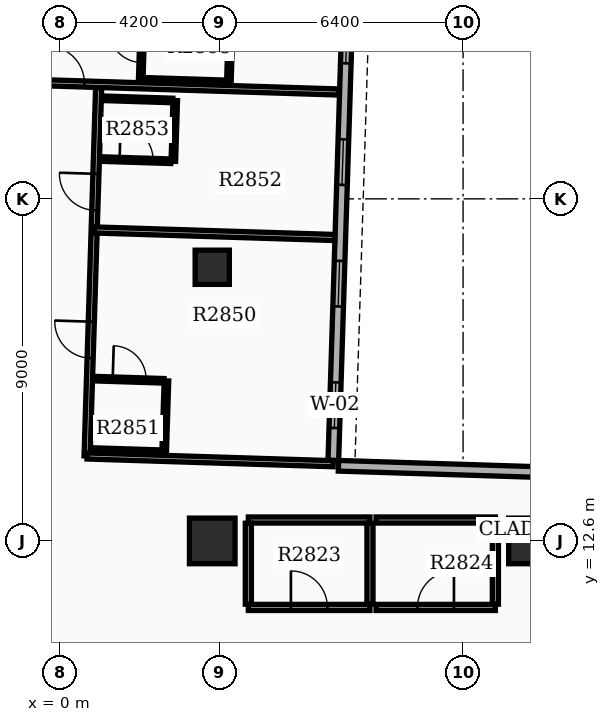
"""IFC4 building model, lengths in metres.
Left out: names, types, materials, properties, quantities, classifications, styles, units other than length and angle.
Written with IfcOpenShell. Run it as: python <this file> out.ifc"""

import sys

from ifc_helpers import new_model, si_unit, direction, frame, frame_2d, origin, origin_2d, place, context, subcontext, project, spatial, rectangle, extrude, element, fill, save


model = new_model("IFC4")
c1 = context("Model", 3, precision=1e-05, world=origin(), true_north=direction((0.0, 1.0)))
c2 = subcontext(c1, "Body", "Model", "MODEL_VIEW")
j1 = project(units=[si_unit("LENGTHUNIT", "METRE"), si_unit("PLANEANGLEUNIT", "RADIAN")], contexts=[c1])
p1 = place(None, origin())
s1 = spatial("IfcSite", under=j1, at=p1, CompositionType="ELEMENT")
p2 = place(p1, origin())
s2 = spatial("IfcBuilding", under=s1, at=p2, CompositionType="ELEMENT")
p3 = place(p2, frame((0.0, 0.0, 176.1)))
s3 = spatial("IfcBuildingStorey", under=s2, at=p3, CompositionType="ELEMENT", Elevation=176.1)
for number, where, z_axis, x_axis in (
    (1, (12.4, 12.6, 0.0), (0.0, 0.0, 1.0), (1.0, 0.0, 0.0)),
    (2, (4.0, 12.6, 0.0), (0.0, 0.0, 1.0), (1.0, 0.0, 0.0)),
):
    element("IfcColumn", number, at=place(p3, frame(where, z_axis=z_axis, x_axis=x_axis)), inside=s3, PredefinedType="COLUMN", context=c2, shape_type="SweptSolid", body=[
        extrude(rectangle(XDim=1.2, YDim=1.2, at=origin_2d()), origin(), (0.0, 0.0, 1.0), 3.9),
    ])
p4 = place(p3, frame((4.0, 19.8, 0.0), z_axis=(0.0, 0.0, 1.0), x_axis=(1.0, 0.0, 0.0)))
e3 = element("IfcColumn", 3, at=p4, inside=s3, PredefinedType="COLUMN", context=c2, shape_type="SweptSolid", body=[
    extrude(rectangle(XDim=0.9, YDim=0.9, at=origin_2d()), origin(), (0.0, 0.0, 1.0), 3.9),
])
p5 = place(p3, frame((7.186, 14.721, 0.0), z_axis=(0.0, 0.0, 1.0), x_axis=(0.031410322165, 0.999506574096, 0.0)))
e4 = element("IfcWall", 4, at=p5, inside=s3, PredefinedType="STANDARD", context=c2, shape_type="SweptSolid", body=[
    extrude(rectangle(XDim=20.1, YDim=0.28, at=frame_2d((10.05, 0.0))), origin(), (0.0, 0.0, 1.0), 2.97),
])
p6 = place(p5, frame((0.85, 0.0, 0.8)))
e5 = element("IfcOpeningElement", 5, at=p6, cuts=e4, PredefinedType="OPENING", context=c2, shape_type="SweptSolid", body=[
    extrude(rectangle(XDim=1.2, YDim=1.6, at=frame_2d((0.6, 0.8))), frame((0.0, 0.15, 0.0), z_axis=(0.0, -1.0, 0.0), x_axis=(1.0, 0.0, 0.0)), (0.0, 0.0, 1.0), 0.3),
])
p7 = place(p5, frame((4.05, 0.0, 0.8)))
e6 = element("IfcOpeningElement", 6, at=p7, cuts=e4, PredefinedType="OPENING", context=c2, shape_type="SweptSolid", body=[
    extrude(rectangle(XDim=1.2, YDim=1.6, at=frame_2d((0.6, 0.8))), frame((0.0, 0.15, 0.0), z_axis=(0.0, -1.0, 0.0), x_axis=(1.0, 0.0, 0.0)), (0.0, 0.0, 1.0), 0.3),
])
p8 = place(p5, frame((7.25, 0.0, 0.8)))
e7 = element("IfcOpeningElement", 7, at=p8, cuts=e4, PredefinedType="OPENING", context=c2, shape_type="SweptSolid", body=[
    extrude(rectangle(XDim=1.2, YDim=1.6, at=frame_2d((0.6, 0.8))), frame((0.0, 0.15, 0.0), z_axis=(0.0, -1.0, 0.0), x_axis=(1.0, 0.0, 0.0)), (0.0, 0.0, 1.0), 0.3),
])
p9 = place(p5, frame((10.45, 0.0, 0.8)))
e8 = element("IfcOpeningElement", 8, at=p9, cuts=e4, PredefinedType="OPENING", context=c2, shape_type="SweptSolid", body=[
    extrude(rectangle(XDim=1.2, YDim=1.6, at=frame_2d((0.6, 0.8))), frame((0.0, 0.15, 0.0), z_axis=(0.0, -1.0, 0.0), x_axis=(1.0, 0.0, 0.0)), (0.0, 0.0, 1.0), 0.3),
])
p10 = place(p3, frame((13.618, 14.379, 0.0), z_axis=(0.0, 0.0, 1.0), x_axis=(-0.999507224741, 0.031389611199, 0.0)))
e9 = element("IfcWall", 9, at=p10, inside=s3, PredefinedType="STANDARD", context=c2, shape_type="SweptSolid", body=[
    extrude(rectangle(XDim=6.3, YDim=0.28, at=frame_2d((3.15, 0.0))), origin(), (0.0, 0.0, 1.0), 2.97),
])
p11 = place(p3, frame((4.95, 10.85, 0.0), z_axis=(0.0, 0.0, 1.0), x_axis=(1.0, 0.0, 0.0)))
e10 = element("IfcWall", 10, at=p11, inside=s3, PredefinedType="PARTITIONING", context=c2, shape_type="SweptSolid", body=[
    extrude(rectangle(XDim=3.2, YDim=0.16, at=frame_2d((1.6, 0.0))), origin(), (0.0, 0.0, 1.0), 2.96),
])
p12 = place(p11, frame((1.12, 0.0, 0.0)))
e11 = element("IfcOpeningElement", 11, at=p12, cuts=e10, PredefinedType="OPENING", context=c2, shape_type="SweptSolid", body=[
    extrude(rectangle(XDim=0.96, YDim=2.15, at=frame_2d((0.48, 1.075))), frame((0.0, 0.09, 0.0), z_axis=(0.0, -1.0, 0.0), x_axis=(1.0, 0.0, 0.0)), (0.0, 0.0, 1.0), 0.18),
])
p13 = place(p3, frame((4.95, 13.15, 0.0), z_axis=(0.0, 0.0, 1.0), x_axis=(1.0, 0.0, 0.0)))
e12 = element("IfcWall", 12, at=p13, inside=s3, PredefinedType="PARTITIONING", context=c2, shape_type="SweptSolid", body=[
    extrude(rectangle(XDim=3.2, YDim=0.16, at=frame_2d((1.6, 0.0))), origin(), (0.0, 0.0, 1.0), 2.96),
])
for number, where, z_axis, x_axis in (
    (13, (4.95, 10.935, 0.0), (0.0, 0.0, 1.0), (0.0, 1.0, 0.0)),
    (14, (8.15, 10.935, 0.0), (0.0, 0.0, 1.0), (0.0, 1.0, 0.0)),
):
    element("IfcWall", number, at=place(p3, frame(where, z_axis=z_axis, x_axis=x_axis)), inside=s3, PredefinedType="PARTITIONING", context=c2, shape_type="SweptSolid", body=[
        extrude(rectangle(XDim=2.13, YDim=0.16, at=frame_2d((1.065, 0.0))), origin(), (0.0, 0.0, 1.0), 2.96),
    ])
p14 = place(p3, frame((8.31, 10.85, 0.0), z_axis=(0.0, 0.0, 1.0), x_axis=(1.0, 0.0, 0.0)))
e15 = element("IfcWall", 15, at=p14, inside=s3, PredefinedType="PARTITIONING", context=c2, shape_type="SweptSolid", body=[
    extrude(rectangle(XDim=3.14, YDim=0.16, at=frame_2d((1.57, 0.0))), origin(), (0.0, 0.0, 1.0), 2.96),
])
p15 = place(p14, frame((1.09, 0.0, 0.0)))
e16 = element("IfcOpeningElement", 16, at=p15, cuts=e15, PredefinedType="OPENING", context=c2, shape_type="SweptSolid", body=[
    extrude(rectangle(XDim=0.96, YDim=2.15, at=frame_2d((0.48, 1.075))), frame((0.0, 0.09, 0.0), z_axis=(0.0, -1.0, 0.0), x_axis=(1.0, 0.0, 0.0)), (0.0, 0.0, 1.0), 0.18),
])
p16 = place(p3, frame((8.31, 13.15, 0.0), z_axis=(0.0, 0.0, 1.0), x_axis=(1.0, 0.0, 0.0)))
e17 = element("IfcWall", 17, at=p16, inside=s3, PredefinedType="PARTITIONING", context=c2, shape_type="SweptSolid", body=[
    extrude(rectangle(XDim=3.14, YDim=0.16, at=frame_2d((1.57, 0.0))), origin(), (0.0, 0.0, 1.0), 2.96),
])
p17 = place(p3, frame((11.45, 10.935, 0.0), z_axis=(0.0, 0.0, 1.0), x_axis=(0.0, 1.0, 0.0)))
e18 = element("IfcWall", 18, at=p17, inside=s3, PredefinedType="PARTITIONING", context=c2, shape_type="SweptSolid", body=[
    extrude(rectangle(XDim=2.13, YDim=0.16, at=frame_2d((1.065, 0.0))), origin(), (0.0, 0.0, 1.0), 2.96),
])
p18 = place(p3, frame((0.706, 14.835, 0.0), z_axis=(0.0, 0.0, 1.0), x_axis=(0.031411552371, 0.999506535435, 0.0)))
e19 = element("IfcWall", 19, at=p18, inside=s3, PredefinedType="PARTITIONING", context=c2, shape_type="SweptSolid", body=[
    extrude(rectangle(XDim=9.7, YDim=0.16, at=frame_2d((4.85, 0.0))), origin(), (0.0, 0.0, 1.0), 2.96),
])
p19 = place(p18, frame((2.575, 0.0, 0.0)))
e20 = element("IfcOpeningElement", 20, at=p19, cuts=e19, PredefinedType="OPENING", context=c2, shape_type="SweptSolid", body=[
    extrude(rectangle(XDim=0.96, YDim=2.15, at=frame_2d((0.48, 1.075))), frame((0.0, 0.09, 0.0), z_axis=(0.0, -1.0, 0.0), x_axis=(1.0, 0.0, 0.0)), (0.0, 0.0, 1.0), 0.18),
])
p20 = place(p18, frame((6.467, 0.0, 0.0)))
e21 = element("IfcOpeningElement", 21, at=p20, cuts=e19, PredefinedType="OPENING", context=c2, shape_type="SweptSolid", body=[
    extrude(rectangle(XDim=0.96, YDim=2.15, at=frame_2d((0.48, 1.075))), frame((0.0, 0.09, 0.0), z_axis=(0.0, -1.0, 0.0), x_axis=(1.0, 0.0, 0.0)), (0.0, 0.0, 1.0), 0.18),
])
p21 = place(p3, frame((0.706, 14.835, 0.0), z_axis=(0.0, 0.0, 1.0), x_axis=(0.999506214218, -0.031421771746, 0.0)))
e22 = element("IfcWall", 22, at=p21, inside=s3, PredefinedType="PARTITIONING", context=c2, shape_type="SweptSolid", body=[
    extrude(rectangle(XDim=6.48, YDim=0.16, at=frame_2d((3.24, 0.0))), origin(), (0.0, 0.0, 1.0), 2.96),
])
p22 = place(p3, frame((0.893, 20.782, 0.0), z_axis=(0.0, 0.0, 1.0), x_axis=(0.999506152458, -0.031423736229, 0.0)))
e23 = element("IfcWall", 23, at=p22, inside=s3, PredefinedType="PARTITIONING", context=c2, shape_type="SweptSolid", body=[
    extrude(rectangle(XDim=6.332, YDim=0.16, at=frame_2d((3.166, 0.0))), origin(), (0.0, 0.0, 1.0), 2.96),
])
p23 = place(p3, frame((0.91, 16.87, 0.0), z_axis=(0.0, 0.0, 1.0), x_axis=(0.999507221803, -0.031389704724, 0.0)))
e24 = element("IfcWall", 24, at=p23, inside=s3, PredefinedType="PARTITIONING", context=c2, shape_type="SweptSolid", body=[
    extrude(rectangle(XDim=1.82, YDim=0.12, at=frame_2d((0.91, 0.0))), origin(), (0.0, 0.0, 1.0), 2.96),
])
p24 = place(p23, frame((0.47, 0.0, 0.0)))
e25 = element("IfcOpeningElement", 25, at=p24, cuts=e24, PredefinedType="OPENING", context=c2, shape_type="SweptSolid", body=[
    extrude(rectangle(XDim=0.88, YDim=2.1, at=frame_2d((0.44, 1.05))), frame((0.0, 0.07, 0.0), z_axis=(0.0, -1.0, 0.0), x_axis=(1.0, 0.0, 0.0)), (0.0, 0.0, 1.0), 0.14),
])
p25 = place(p3, frame((0.851, 14.991, 0.0), z_axis=(0.0, 0.0, 1.0), x_axis=(0.999507221803, -0.031389704724, 0.0)))
e26 = element("IfcWall", 26, at=p25, inside=s3, PredefinedType="PARTITIONING", context=c2, shape_type="SweptSolid", body=[
    extrude(rectangle(XDim=1.82, YDim=0.12, at=frame_2d((0.91, 0.0))), origin(), (0.0, 0.0, 1.0), 2.96),
])
p26 = place(p3, frame((2.735, 14.931, 0.0), z_axis=(0.0, 0.0, 1.0), x_axis=(0.031425292588, 0.999506103526, 0.0)))
e27 = element("IfcWall", 27, at=p26, inside=s3, PredefinedType="PARTITIONING", context=c2, shape_type="SweptSolid", body=[
    extrude(rectangle(XDim=1.88, YDim=0.12, at=frame_2d((0.94, 0.0))), origin(), (0.0, 0.0, 1.0), 2.96),
])
p27 = place(p3, frame((1.092, 22.647, 0.0), z_axis=(0.0, 0.0, 1.0), x_axis=(0.999503004171, -0.03152371574, 0.0)))
e28 = element("IfcWall", 28, at=p27, inside=s3, PredefinedType="PARTITIONING", context=c2, shape_type="SweptSolid", body=[
    extrude(rectangle(XDim=1.82, YDim=0.12, at=frame_2d((0.91, 0.0))), origin(), (0.0, 0.0, 1.0), 2.96),
])
p28 = place(p27, frame((0.47, 0.0, 0.0)))
e29 = element("IfcOpeningElement", 29, at=p28, cuts=e28, PredefinedType="OPENING", context=c2, shape_type="SweptSolid", body=[
    extrude(rectangle(XDim=0.88, YDim=2.1, at=frame_2d((0.44, 1.05))), frame((0.0, 0.07, 0.0), z_axis=(0.0, -1.0, 0.0), x_axis=(1.0, 0.0, 0.0)), (0.0, 0.0, 1.0), 0.14),
])
p29 = place(p3, frame((1.142, 24.246, 0.0), z_axis=(0.0, 0.0, 1.0), x_axis=(0.999507221803, -0.031389704724, 0.0)))
e30 = element("IfcWall", 30, at=p29, inside=s3, PredefinedType="PARTITIONING", context=c2, shape_type="SweptSolid", body=[
    extrude(rectangle(XDim=1.82, YDim=0.12, at=frame_2d((0.91, 0.0))), origin(), (0.0, 0.0, 1.0), 2.96),
])
p30 = place(p3, frame((2.976, 22.588, 0.0), z_axis=(0.0, 0.0, 1.0), x_axis=(0.031277621856, 0.999510735496, 0.0)))
e31 = element("IfcWall", 31, at=p30, inside=s3, PredefinedType="PARTITIONING", context=c2, shape_type="SweptSolid", body=[
    extrude(rectangle(XDim=1.6, YDim=0.12, at=frame_2d((0.8, 0.0))), origin(), (0.0, 0.0, 1.0), 2.96),
])
p31 = place(p3, frame((-5.795, 24.824, 0.0), z_axis=(0.0, 0.0, 1.0), x_axis=(0.999507189267, -0.031390740738, 0.0)))
e32 = element("IfcWall", 32, at=p31, inside=s3, PredefinedType="PARTITIONING", context=c2, shape_type="SweptSolid", body=[
    extrude(rectangle(XDim=13.144, YDim=0.16, at=frame_2d((6.572, 0.0))), origin(), (0.0, 0.0, 1.0), 2.96),
])
p32 = place(p31, frame((5.472, 0.0, 0.0)))
e33 = element("IfcOpeningElement", 33, at=p32, cuts=e32, PredefinedType="OPENING", context=c2, shape_type="SweptSolid", body=[
    extrude(rectangle(XDim=0.96, YDim=2.15, at=frame_2d((0.48, 1.075))), frame((0.0, 0.09, 0.0), z_axis=(0.0, -1.0, 0.0), x_axis=(1.0, 0.0, 0.0)), (0.0, 0.0, 1.0), 0.18),
])
p33 = place(p3, frame((2.118, 24.736, 0.0), z_axis=(0.0, 0.0, 1.0), x_axis=(0.03152371574, 0.999503004171, 0.0)))
e34 = element("IfcWall", 34, at=p33, inside=s3, PredefinedType="PARTITIONING", context=c2, shape_type="SweptSolid", body=[
    extrude(rectangle(XDim=1.82, YDim=0.12, at=frame_2d((0.91, 0.0))), origin(), (0.0, 0.0, 1.0), 2.96),
])
p34 = place(p33, frame((0.45, 0.0, 0.0)))
e35 = element("IfcOpeningElement", 35, at=p34, cuts=e34, PredefinedType="OPENING", context=c2, shape_type="SweptSolid", body=[
    extrude(rectangle(XDim=0.88, YDim=2.1, at=frame_2d((0.44, 1.05))), frame((0.0, 0.07, 0.0), z_axis=(0.0, -1.0, 0.0), x_axis=(1.0, 0.0, 0.0)), (0.0, 0.0, 1.0), 0.14),
])
p35 = place(p3, frame((4.437, 24.663, 0.0), z_axis=(0.0, 0.0, 1.0), x_axis=(0.031255692016, 0.999511421504, 0.0)))
e36 = element("IfcWall", 36, at=p35, inside=s3, PredefinedType="PARTITIONING", context=c2, shape_type="SweptSolid", body=[
    extrude(rectangle(XDim=1.82, YDim=0.12, at=frame_2d((0.91, 0.0))), origin(), (0.0, 0.0, 1.0), 2.96),
])
p36 = place(p3, frame((2.188, 24.733, 0.0), z_axis=(0.0, 0.0, 1.0), x_axis=(0.999508244557, -0.031357121398, 0.0)))
e37 = element("IfcWall", 37, at=p36, inside=s3, PredefinedType="PARTITIONING", context=c2, shape_type="SweptSolid", body=[
    extrude(rectangle(XDim=2.18, YDim=0.12, at=frame_2d((1.09, 0.0))), origin(), (0.0, 0.0, 1.0), 2.96),
])
p37 = place(p6, origin())
e38 = element("IfcWindow", 38, at=p37, inside=s3, PartitioningType="SINGLE_PANEL", PredefinedType="WINDOW", context=c2, shape_type="SweptSolid", body=[
    extrude(rectangle(XDim=1.2, YDim=1.6, at=frame_2d((0.6, 0.8))), frame((0.0, 0.03, 0.0), z_axis=(0.0, -1.0, 0.0), x_axis=(1.0, 0.0, 0.0)), (0.0, 0.0, 1.0), 0.06),
])
fill(e5, e38)
p38 = place(p7, origin())
e39 = element("IfcWindow", 39, at=p38, inside=s3, PartitioningType="SINGLE_PANEL", PredefinedType="WINDOW", context=c2, shape_type="SweptSolid", body=[
    extrude(rectangle(XDim=1.2, YDim=1.6, at=frame_2d((0.6, 0.8))), frame((0.0, 0.03, 0.0), z_axis=(0.0, -1.0, 0.0), x_axis=(1.0, 0.0, 0.0)), (0.0, 0.0, 1.0), 0.06),
])
fill(e6, e39)
p39 = place(p8, origin())
e40 = element("IfcWindow", 40, at=p39, inside=s3, PartitioningType="SINGLE_PANEL", PredefinedType="WINDOW", context=c2, shape_type="SweptSolid", body=[
    extrude(rectangle(XDim=1.2, YDim=1.6, at=frame_2d((0.6, 0.8))), frame((0.0, 0.03, 0.0), z_axis=(0.0, -1.0, 0.0), x_axis=(1.0, 0.0, 0.0)), (0.0, 0.0, 1.0), 0.06),
])
fill(e7, e40)
p40 = place(p9, origin())
e41 = element("IfcWindow", 41, at=p40, inside=s3, PartitioningType="SINGLE_PANEL", PredefinedType="WINDOW", context=c2, shape_type="SweptSolid", body=[
    extrude(rectangle(XDim=1.2, YDim=1.6, at=frame_2d((0.6, 0.8))), frame((0.0, 0.03, 0.0), z_axis=(0.0, -1.0, 0.0), x_axis=(1.0, 0.0, 0.0)), (0.0, 0.0, 1.0), 0.06),
])
fill(e8, e41)
p41 = place(p12, origin())
e42 = element("IfcDoor", 42, at=p41, inside=s3, OperationType="SINGLE_SWING_LEFT", PredefinedType="DOOR", context=c2, shape_type="SweptSolid", body=[
    extrude(rectangle(XDim=0.96, YDim=2.15, at=frame_2d((0.48, 1.075))), frame((0.0, 0.025, 0.0), z_axis=(0.0, -1.0, 0.0), x_axis=(1.0, 0.0, 0.0)), (0.0, 0.0, 1.0), 0.05),
])
fill(e11, e42)
p42 = place(p15, origin())
e43 = element("IfcDoor", 43, at=p42, inside=s3, OperationType="SINGLE_SWING_RIGHT", PredefinedType="DOOR", context=c2, shape_type="SweptSolid", body=[
    extrude(rectangle(XDim=0.96, YDim=2.15, at=frame_2d((0.48, 1.075))), frame((0.0, 0.025, 0.0), z_axis=(0.0, -1.0, 0.0), x_axis=(1.0, 0.0, 0.0)), (0.0, 0.0, 1.0), 0.05),
])
fill(e16, e43)
p43 = place(p19, origin())
e44 = element("IfcDoor", 44, at=p43, inside=s3, OperationType="SINGLE_SWING_RIGHT", PredefinedType="DOOR", context=c2, shape_type="SweptSolid", body=[
    extrude(rectangle(XDim=0.96, YDim=2.15, at=frame_2d((0.48, 1.075))), frame((0.0, 0.025, 0.0), z_axis=(0.0, -1.0, 0.0), x_axis=(1.0, 0.0, 0.0)), (0.0, 0.0, 1.0), 0.05),
])
fill(e20, e44)
p44 = place(p24, origin())
e45 = element("IfcDoor", 45, at=p44, inside=s3, OperationType="SINGLE_SWING_LEFT", PredefinedType="DOOR", context=c2, shape_type="SweptSolid", body=[
    extrude(rectangle(XDim=0.88, YDim=2.1, at=frame_2d((0.44, 1.05))), frame((0.0, 0.025, 0.0), z_axis=(0.0, -1.0, 0.0), x_axis=(1.0, 0.0, 0.0)), (0.0, 0.0, 1.0), 0.05),
])
fill(e25, e45)
p45 = place(p20, origin())
e46 = element("IfcDoor", 46, at=p45, inside=s3, OperationType="SINGLE_SWING_RIGHT", PredefinedType="DOOR", context=c2, shape_type="SweptSolid", body=[
    extrude(rectangle(XDim=0.96, YDim=2.15, at=frame_2d((0.48, 1.075))), frame((0.0, 0.025, 0.0), z_axis=(0.0, -1.0, 0.0), x_axis=(1.0, 0.0, 0.0)), (0.0, 0.0, 1.0), 0.05),
])
fill(e21, e46)
p46 = place(p28, origin())
e47 = element("IfcDoor", 47, at=p46, inside=s3, OperationType="SINGLE_SWING_LEFT", PredefinedType="DOOR", context=c2, shape_type="SweptSolid", body=[
    extrude(rectangle(XDim=0.88, YDim=2.1, at=frame_2d((0.44, 1.05))), frame((0.0, 0.025, 0.0), z_axis=(0.0, -1.0, 0.0), x_axis=(1.0, 0.0, 0.0)), (0.0, 0.0, 1.0), 0.05),
])
fill(e29, e47)
p47 = place(p32, origin())
e48 = element("IfcDoor", 48, at=p47, inside=s3, OperationType="SINGLE_SWING_LEFT", PredefinedType="DOOR", context=c2, shape_type="SweptSolid", body=[
    extrude(rectangle(XDim=0.96, YDim=2.15, at=frame_2d((0.48, 1.075))), frame((0.0, 0.025, 0.0), z_axis=(0.0, -1.0, 0.0), x_axis=(1.0, 0.0, 0.0)), (0.0, 0.0, 1.0), 0.05),
])
fill(e33, e48)
p48 = place(p34, origin())
e49 = element("IfcDoor", 49, at=p48, inside=s3, OperationType="SINGLE_SWING_RIGHT", PredefinedType="DOOR", context=c2, shape_type="SweptSolid", body=[
    extrude(rectangle(XDim=0.88, YDim=2.1, at=frame_2d((0.44, 1.05))), frame((0.0, 0.025, 0.0), z_axis=(0.0, -1.0, 0.0), x_axis=(1.0, 0.0, 0.0)), (0.0, 0.0, 1.0), 0.05),
])
fill(e35, e49)
save(model, sys.argv[1])
